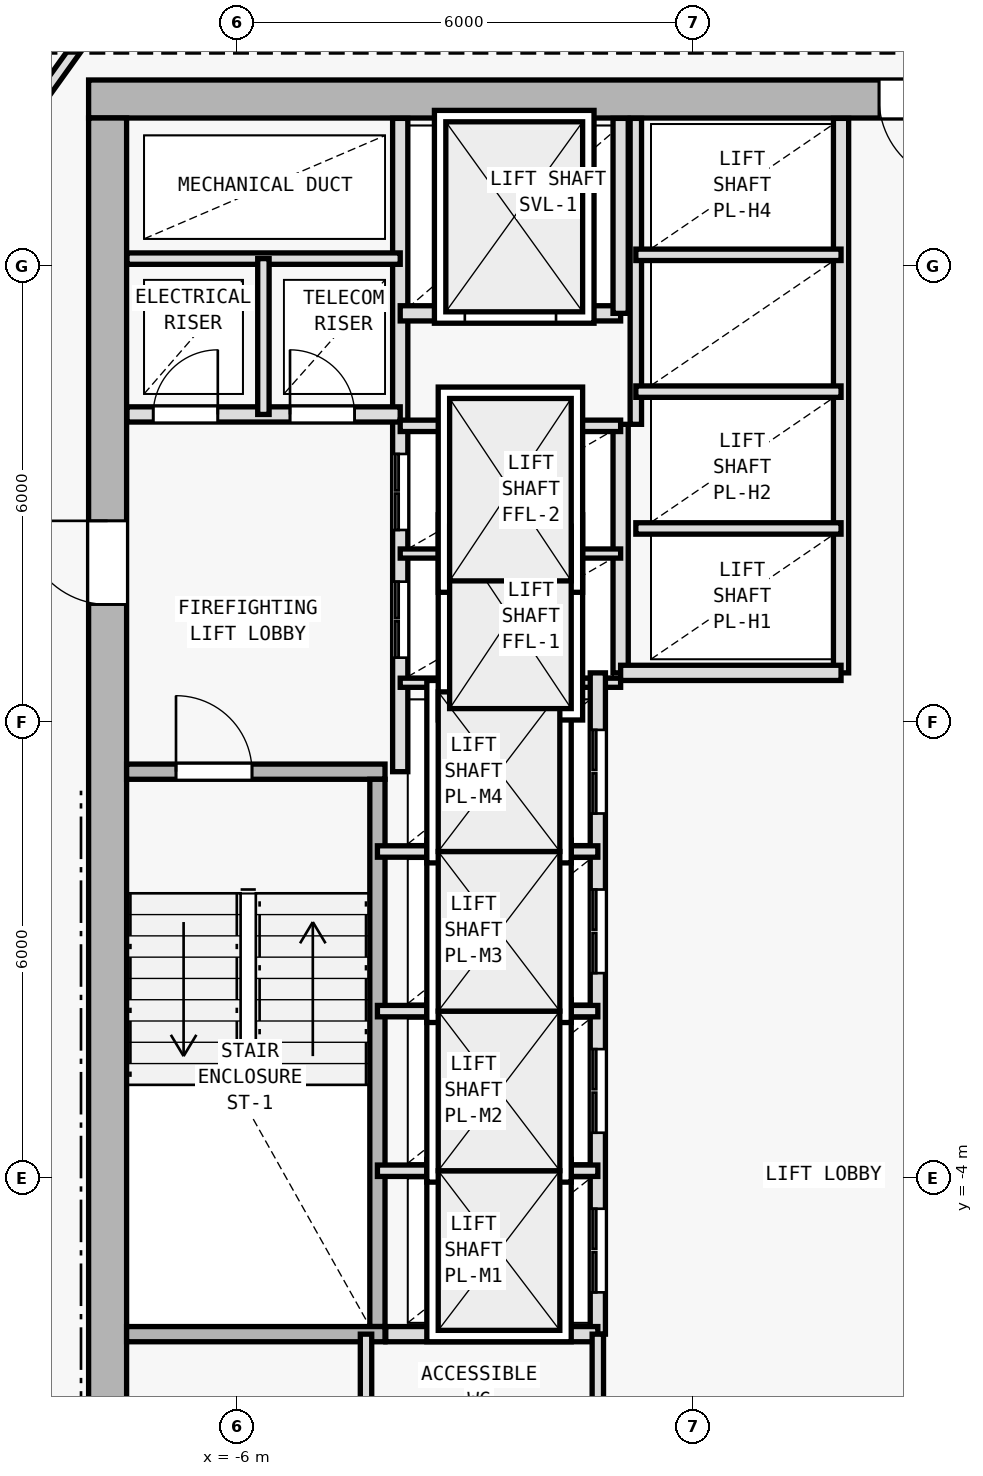
"""IFC4 building model, lengths in metres.
Left out: names, types, materials, properties, quantities, classifications, styles, units other than length and angle.
Written with IfcOpenShell. Run it as: python <this file> out.ifc"""

import sys

from ifc_helpers import new_model, si_unit, direction, frame, frame_2d, origin, origin_2d, place, context, subcontext, project, spatial, rectangle, i_section, extrude, element, fill, save


model = new_model("IFC4")
c1 = context("Model", 3, precision=1e-05, world=origin(), true_north=direction((0.0, 1.0)))
c2 = subcontext(c1, "Body", "Model", "MODEL_VIEW")
j1 = project(units=[si_unit("LENGTHUNIT", "METRE"), si_unit("PLANEANGLEUNIT", "RADIAN")], contexts=[c1])
p1 = place(None, origin())
s1 = spatial("IfcSite", under=j1, at=p1, CompositionType="ELEMENT")
p2 = place(p1, origin())
s2 = spatial("IfcBuilding", under=s1, at=p2, CompositionType="ELEMENT")
p3 = place(p2, frame((0.0, 0.0, 153.0)))
s3 = spatial("IfcBuildingStorey", under=s2, at=p3, CompositionType="ELEMENT", Elevation=153.0)
for number, where, z_axis, x_axis in (
    (1, (-7.7, 10.2, 0.0), (0.0, 0.0, 1.0), (1.0, 0.0, 0.0)),
    (2, (-7.7, 2.0, 0.0), (0.0, 0.0, 1.0), (1.0, 0.0, 0.0)),
):
    element("IfcColumn", number, at=place(p3, frame(where, z_axis=z_axis, x_axis=x_axis)), inside=s3, PredefinedType="COLUMN", context=c2, shape_type="SweptSolid", body=[
        extrude(i_section(OverallWidth=0.404, OverallDepth=0.407, WebThickness=0.017, FlangeThickness=0.028, FilletRadius=0.015, at=origin_2d()), origin(), (0.0, 0.0, 1.0), 3.6),
    ])
p4 = place(p3, frame((7.95, 10.2, 0.0), z_axis=(0.0, 0.0, 1.0), x_axis=(-1.0, 0.0, 0.0)))
e3 = element("IfcWall", 3, at=p4, inside=s3, PredefinedType="SHEAR", context=c2, shape_type="SweptSolid", body=[
    extrude(rectangle(XDim=15.9, YDim=0.5, at=frame_2d((7.95, 0.0))), origin(), (0.0, 0.0, 1.0), 3.35),
])
p5 = place(p4, frame((4.4, 0.0, 0.0)))
e4 = element("IfcOpeningElement", 4, at=p5, cuts=e3, PredefinedType="OPENING", context=c2, shape_type="SweptSolid", body=[
    extrude(rectangle(XDim=1.1, YDim=2.15, at=frame_2d((0.55, 1.075))), frame((0.0, 0.26, 0.0), z_axis=(0.0, -1.0, 0.0), x_axis=(1.0, 0.0, 0.0)), (0.0, 0.0, 1.0), 0.52),
])
p6 = place(p3, frame((-7.7, -9.15, 0.0), z_axis=(0.0, 0.0, 1.0), x_axis=(0.0, 1.0, 0.0)))
e5 = element("IfcWall", 5, at=p6, inside=s3, PredefinedType="SHEAR", context=c2, shape_type="SweptSolid", body=[
    extrude(rectangle(XDim=19.1, YDim=0.5, at=frame_2d((9.55, 0.0))), origin(), (0.0, 0.0, 1.0), 3.35),
])
p7 = place(p6, frame((12.7, 0.0, 0.0)))
e6 = element("IfcOpeningElement", 6, at=p7, cuts=e5, PredefinedType="OPENING", context=c2, shape_type="SweptSolid", body=[
    extrude(rectangle(XDim=1.1, YDim=2.15, at=frame_2d((0.55, 1.075))), frame((0.0, 0.26, 0.0), z_axis=(0.0, -1.0, 0.0), x_axis=(1.0, 0.0, 0.0)), (0.0, 0.0, 1.0), 0.52),
])
p8 = place(p3, frame((-7.45, 1.35, 0.0), z_axis=(0.0, 0.0, 1.0), x_axis=(1.0, 0.0, 0.0)))
e7 = element("IfcWall", 7, at=p8, inside=s3, PredefinedType="SOLIDWALL", context=c2, shape_type="SweptSolid", body=[
    extrude(rectangle(XDim=3.4, YDim=0.2, at=frame_2d((1.7, 0.0))), origin(), (0.0, 0.0, 1.0), 3.35),
])
p9 = place(p8, frame((0.65, 0.0, 0.0)))
e8 = element("IfcOpeningElement", 8, at=p9, cuts=e7, PredefinedType="OPENING", context=c2, shape_type="SweptSolid", body=[
    extrude(rectangle(XDim=1.0, YDim=2.15, at=frame_2d((0.5, 1.075))), frame((0.0, 0.11, 0.0), z_axis=(0.0, -1.0, 0.0), x_axis=(1.0, 0.0, 0.0)), (0.0, 0.0, 1.0), 0.22),
])
p10 = place(p3, frame((-4.15, -5.95, 0.0), z_axis=(0.0, 0.0, 1.0), x_axis=(0.0, 1.0, 0.0)))
e9 = element("IfcWall", 9, at=p10, inside=s3, PredefinedType="SOLIDWALL", context=c2, shape_type="SweptSolid", body=[
    extrude(rectangle(XDim=7.2, YDim=0.2, at=frame_2d((3.6, 0.0))), origin(), (0.0, 0.0, 1.0), 3.35),
])
p11 = place(p3, frame((-3.85, 1.35, 0.0), z_axis=(0.0, 0.0, 1.0), x_axis=(0.0, 1.0, 0.0)))
e10 = element("IfcWall", 10, at=p11, inside=s3, PredefinedType="SOLIDWALL", context=c2, shape_type="SweptSolid", body=[
    extrude(rectangle(XDim=8.595, YDim=0.2, at=frame_2d((4.297, 0.0))), origin(), (0.0, 0.0, 1.0), 3.35),
])
p12 = place(p11, frame((1.5, 0.0, 0.0)))
e11 = element("IfcOpeningElement", 11, at=p12, cuts=e10, PredefinedType="OPENING", context=c2, shape_type="SweptSolid", body=[
    extrude(rectangle(XDim=1.0, YDim=2.15, at=frame_2d((0.5, 1.075))), frame((0.0, 0.11, 0.0), z_axis=(0.0, -1.0, 0.0), x_axis=(1.0, 0.0, 0.0)), (0.0, 0.0, 1.0), 0.22),
])
p13 = place(p11, frame((3.18, 0.0, 0.0)))
e12 = element("IfcOpeningElement", 12, at=p13, cuts=e10, PredefinedType="OPENING", context=c2, shape_type="SweptSolid", body=[
    extrude(rectangle(XDim=1.0, YDim=2.15, at=frame_2d((0.5, 1.075))), frame((0.0, 0.11, 0.0), z_axis=(0.0, -1.0, 0.0), x_axis=(1.0, 0.0, 0.0)), (0.0, 0.0, 1.0), 0.22),
])
p14 = place(p3, frame((-7.445, 6.05, 0.0), z_axis=(0.0, 0.0, 1.0), x_axis=(1.0, 0.0, 0.0)))
e13 = element("IfcWall", 13, at=p14, inside=s3, PredefinedType="SOLIDWALL", context=c2, shape_type="SweptSolid", body=[
    extrude(rectangle(XDim=3.595, YDim=0.2, at=frame_2d((1.797, 0.0))), origin(), (0.0, 0.0, 1.0), 3.35),
])
p15 = place(p14, frame((0.345, 0.0, 0.0)))
e14 = element("IfcOpeningElement", 14, at=p15, cuts=e13, PredefinedType="OPENING", context=c2, shape_type="SweptSolid", body=[
    extrude(rectangle(XDim=0.85, YDim=2.1, at=frame_2d((0.425, 1.05))), frame((0.0, 0.11, 0.0), z_axis=(0.0, -1.0, 0.0), x_axis=(1.0, 0.0, 0.0)), (0.0, 0.0, 1.0), 0.22),
])
p16 = place(p14, frame((2.145, 0.0, 0.0)))
e15 = element("IfcOpeningElement", 15, at=p16, cuts=e13, PredefinedType="OPENING", context=c2, shape_type="SweptSolid", body=[
    extrude(rectangle(XDim=0.85, YDim=2.1, at=frame_2d((0.425, 1.05))), frame((0.0, 0.11, 0.0), z_axis=(0.0, -1.0, 0.0), x_axis=(1.0, 0.0, 0.0)), (0.0, 0.0, 1.0), 0.22),
])
p17 = place(p3, frame((-7.445, 8.1, 0.0), z_axis=(0.0, 0.0, 1.0), x_axis=(1.0, 0.0, 0.0)))
e16 = element("IfcWall", 16, at=p17, inside=s3, PredefinedType="PARTITIONING", context=c2, shape_type="SweptSolid", body=[
    extrude(rectangle(XDim=3.595, YDim=0.15, at=frame_2d((1.797, 0.0))), origin(), (0.0, 0.0, 1.0), 3.35),
])
p18 = place(p3, frame((-5.65, 6.05, 0.0), z_axis=(0.0, 0.0, 1.0), x_axis=(0.0, 1.0, 0.0)))
e17 = element("IfcWall", 17, at=p18, inside=s3, PredefinedType="PARTITIONING", context=c2, shape_type="SweptSolid", body=[
    extrude(rectangle(XDim=2.05, YDim=0.15, at=frame_2d((1.025, 0.0))), origin(), (0.0, 0.0, 1.0), 3.35),
])
p19 = place(p3, frame((-0.95, 2.65, 0.0), z_axis=(0.0, 0.0, 1.0), x_axis=(0.0, 1.0, 0.0)))
e18 = element("IfcWall", 18, at=p19, inside=s3, PredefinedType="SOLIDWALL", context=c2, shape_type="SweptSolid", body=[
    extrude(rectangle(XDim=3.27, YDim=0.2, at=frame_2d((1.635, 0.0))), origin(), (0.0, 0.0, 1.0), 3.35),
])
for number, where, z_axis, x_axis in (
    (19, (-3.85, 2.52, 0.0), (0.0, 0.0, 1.0), (1.0, 0.0, 0.0)),
    (20, (-3.85, 4.22, 0.0), (0.0, 0.0, 1.0), (1.0, 0.0, 0.0)),
):
    element("IfcWall", number, at=place(p3, frame(where, z_axis=z_axis, x_axis=x_axis)), inside=s3, PredefinedType="PARTITIONING", context=c2, shape_type="SweptSolid", body=[
        extrude(rectangle(XDim=2.9, YDim=0.12, at=frame_2d((1.45, 0.0))), origin(), (0.0, 0.0, 1.0), 3.35),
    ])
p20 = place(p3, frame((-3.85, 5.9, 0.0), z_axis=(0.0, 0.0, 1.0), x_axis=(1.0, 0.0, 0.0)))
e21 = element("IfcWall", 21, at=p20, inside=s3, PredefinedType="PARTITIONING", context=c2, shape_type="SweptSolid", body=[
    extrude(rectangle(XDim=2.9, YDim=0.15, at=frame_2d((1.45, 0.0))), origin(), (0.0, 0.0, 1.0), 3.35),
])
p21 = place(p3, frame((-3.85, 7.38, 0.0), z_axis=(0.0, 0.0, 1.0), x_axis=(1.0, 0.0, 0.0)))
e22 = element("IfcWall", 22, at=p21, inside=s3, PredefinedType="SOLIDWALL", context=c2, shape_type="SweptSolid", body=[
    extrude(rectangle(XDim=2.9, YDim=0.2, at=frame_2d((1.45, 0.0))), origin(), (0.0, 0.0, 1.0), 3.35),
])
p22 = place(p21, frame((0.85, 0.0, 0.0)))
e23 = element("IfcOpeningElement", 23, at=p22, cuts=e22, PredefinedType="OPENING", context=c2, shape_type="SweptSolid", body=[
    extrude(rectangle(XDim=1.2, YDim=2.2, at=frame_2d((0.6, 1.1))), frame((0.0, 0.11, 0.0), z_axis=(0.0, -1.0, 0.0), x_axis=(1.0, 0.0, 0.0)), (0.0, 0.0, 1.0), 0.22),
])
p23 = place(p3, frame((-0.95, 7.38, 0.0), z_axis=(0.0, 0.0, 1.0), x_axis=(0.0, 1.0, 0.0)))
e24 = element("IfcWall", 24, at=p23, inside=s3, PredefinedType="SOLIDWALL", context=c2, shape_type="SweptSolid", body=[
    extrude(rectangle(XDim=2.565, YDim=0.2, at=frame_2d((1.283, 0.0))), origin(), (0.0, 0.0, 1.0), 3.35),
])
p24 = place(p3, frame((-1.25, -6.05, 0.0), z_axis=(0.0, 0.0, 1.0), x_axis=(0.0, 1.0, 0.0)))
e25 = element("IfcWall", 25, at=p24, inside=s3, PredefinedType="SOLIDWALL", context=c2, shape_type="SweptSolid", body=[
    extrude(rectangle(XDim=8.7, YDim=0.2, at=frame_2d((4.35, 0.0))), origin(), (0.0, 0.0, 1.0), 3.35),
])
p25 = place(p24, frame((0.55, 0.0, 0.0)))
e26 = element("IfcOpeningElement", 26, at=p25, cuts=e25, PredefinedType="OPENING", context=c2, shape_type="SweptSolid", body=[
    extrude(rectangle(XDim=1.1, YDim=2.15, at=frame_2d((0.55, 1.075))), frame((0.0, 0.11, 0.0), z_axis=(0.0, -1.0, 0.0), x_axis=(1.0, 0.0, 0.0)), (0.0, 0.0, 1.0), 0.22),
])
p26 = place(p24, frame((2.65, 0.0, 0.0)))
e27 = element("IfcOpeningElement", 27, at=p26, cuts=e25, PredefinedType="OPENING", context=c2, shape_type="SweptSolid", body=[
    extrude(rectangle(XDim=1.1, YDim=2.15, at=frame_2d((0.55, 1.075))), frame((0.0, 0.11, 0.0), z_axis=(0.0, -1.0, 0.0), x_axis=(1.0, 0.0, 0.0)), (0.0, 0.0, 1.0), 0.22),
])
p27 = place(p24, frame((4.75, 0.0, 0.0)))
e28 = element("IfcOpeningElement", 28, at=p27, cuts=e25, PredefinedType="OPENING", context=c2, shape_type="SweptSolid", body=[
    extrude(rectangle(XDim=1.1, YDim=2.15, at=frame_2d((0.55, 1.075))), frame((0.0, 0.11, 0.0), z_axis=(0.0, -1.0, 0.0), x_axis=(1.0, 0.0, 0.0)), (0.0, 0.0, 1.0), 0.22),
])
p28 = place(p24, frame((6.85, 0.0, 0.0)))
e29 = element("IfcOpeningElement", 29, at=p28, cuts=e25, PredefinedType="OPENING", context=c2, shape_type="SweptSolid", body=[
    extrude(rectangle(XDim=1.1, YDim=2.15, at=frame_2d((0.55, 1.075))), frame((0.0, 0.11, 0.0), z_axis=(0.0, -1.0, 0.0), x_axis=(1.0, 0.0, 0.0)), (0.0, 0.0, 1.0), 0.22),
])
for number, where, z_axis, x_axis in (
    (30, (-4.15, -3.9, 0.0), (0.0, 0.0, 1.0), (1.0, 0.0, 0.0)),
    (31, (-4.15, -1.8, 0.0), (0.0, 0.0, 1.0), (1.0, 0.0, 0.0)),
    (32, (-4.15, 0.3, 0.0), (0.0, 0.0, 1.0), (1.0, 0.0, 0.0)),
):
    element("IfcWall", number, at=place(p3, frame(where, z_axis=z_axis, x_axis=x_axis)), inside=s3, PredefinedType="PARTITIONING", context=c2, shape_type="SweptSolid", body=[
        extrude(rectangle(XDim=2.9, YDim=0.15, at=frame_2d((1.45, 0.0))), origin(), (0.0, 0.0, 1.0), 3.35),
    ])
p29 = place(p3, frame((1.95, 2.65, 0.0), z_axis=(0.0, 0.0, 1.0), x_axis=(0.0, 1.0, 0.0)))
e33 = element("IfcWall", 33, at=p29, inside=s3, PredefinedType="SOLIDWALL", context=c2, shape_type="SweptSolid", body=[
    extrude(rectangle(XDim=7.295, YDim=0.2, at=frame_2d((3.647, 0.0))), origin(), (0.0, 0.0, 1.0), 3.35),
])
p30 = place(p3, frame((-0.95, 2.65, 0.0), z_axis=(0.0, 0.0, 1.0), x_axis=(1.0, 0.0, 0.0)))
e34 = element("IfcWall", 34, at=p30, inside=s3, PredefinedType="SOLIDWALL", context=c2, shape_type="SweptSolid", body=[
    extrude(rectangle(XDim=2.9, YDim=0.2, at=frame_2d((1.45, 0.0))), origin(), (0.0, 0.0, 1.0), 3.35),
])
p31 = place(p3, frame((-0.75, 5.92, 0.0), z_axis=(0.0, 0.0, 1.0), x_axis=(0.0, 1.0, 0.0)))
e35 = element("IfcWall", 35, at=p31, inside=s3, PredefinedType="PARTITIONING", context=c2, shape_type="SweptSolid", body=[
    extrude(rectangle(XDim=4.025, YDim=0.15, at=frame_2d((2.013, 0.0))), origin(), (0.0, 0.0, 1.0), 3.35),
])
for number, where, z_axis, x_axis in (
    (36, (-0.75, 4.55, 0.0), (0.0, 0.0, 1.0), (1.0, 0.0, 0.0)),
    (37, (-0.75, 6.35, 0.0), (0.0, 0.0, 1.0), (1.0, 0.0, 0.0)),
    (38, (-0.75, 8.15, 0.0), (0.0, 0.0, 1.0), (1.0, 0.0, 0.0)),
):
    element("IfcWall", number, at=place(p3, frame(where, z_axis=z_axis, x_axis=x_axis)), inside=s3, PredefinedType="PARTITIONING", context=c2, shape_type="SweptSolid", body=[
        extrude(rectangle(XDim=2.7, YDim=0.15, at=frame_2d((1.35, 0.0))), origin(), (0.0, 0.0, 1.0), 3.35),
    ])
p32 = place(p3, frame((-7.45, -6.05, 0.0), z_axis=(0.0, 0.0, 1.0), x_axis=(1.0, 0.0, 0.0)))
e39 = element("IfcWall", 39, at=p32, inside=s3, PredefinedType="SOLIDWALL", context=c2, shape_type="SweptSolid", body=[
    extrude(rectangle(XDim=3.4, YDim=0.2, at=frame_2d((1.7, 0.0))), origin(), (0.0, 0.0, 1.0), 3.35),
])
p33 = place(p3, frame((-4.04, -6.05, 0.0), z_axis=(0.0, 0.0, 1.0), x_axis=(1.0, 0.0, 0.0)))
e40 = element("IfcWall", 40, at=p33, inside=s3, PredefinedType="SOLIDWALL", context=c2, shape_type="SweptSolid", body=[
    extrude(rectangle(XDim=2.79, YDim=0.2, at=frame_2d((1.395, 0.0))), origin(), (0.0, 0.0, 1.0), 3.35),
])
p34 = place(p3, frame((-1.25, -9.145, 0.0), z_axis=(0.0, 0.0, 1.0), x_axis=(0.0, 1.0, 0.0)))
e41 = element("IfcWall", 41, at=p34, inside=s3, PredefinedType="PARTITIONING", context=c2, shape_type="SweptSolid", body=[
    extrude(rectangle(XDim=3.095, YDim=0.15, at=frame_2d((1.547, 0.0))), origin(), (0.0, 0.0, 1.0), 3.35),
])
p35 = place(p34, frame((0.845, 0.0, 0.0)))
e42 = element("IfcOpeningElement", 42, at=p35, cuts=e41, PredefinedType="OPENING", context=c2, shape_type="SweptSolid", body=[
    extrude(rectangle(XDim=0.95, YDim=2.1, at=frame_2d((0.475, 1.05))), frame((0.0, 0.085, 0.0), z_axis=(0.0, -1.0, 0.0), x_axis=(1.0, 0.0, 0.0)), (0.0, 0.0, 1.0), 0.17),
])
p36 = place(p3, frame((-4.3, -9.145, 0.0), z_axis=(0.0, 0.0, 1.0), x_axis=(0.0, 1.0, 0.0)))
e43 = element("IfcWall", 43, at=p36, inside=s3, PredefinedType="PARTITIONING", context=c2, shape_type="SweptSolid", body=[
    extrude(rectangle(XDim=3.095, YDim=0.15, at=frame_2d((1.547, 0.0))), origin(), (0.0, 0.0, 1.0), 3.35),
])
p37 = place(p36, frame((0.845, 0.0, 0.0)))
e44 = element("IfcOpeningElement", 44, at=p37, cuts=e43, PredefinedType="OPENING", context=c2, shape_type="SweptSolid", body=[
    extrude(rectangle(XDim=0.9, YDim=2.1, at=frame_2d((0.45, 1.05))), frame((0.0, 0.085, 0.0), z_axis=(0.0, -1.0, 0.0), x_axis=(1.0, 0.0, 0.0)), (0.0, 0.0, 1.0), 0.17),
])
p38 = place(p3, frame((-9.86, 8.426, 0.0), z_axis=(0.0, 0.0, 1.0), x_axis=(0.582449511476, 0.812866881218, 0.0)))
e45 = element("IfcWall", 45, at=p38, inside=s3, PredefinedType="PARTITIONING", context=c2, shape_type="SweptSolid", body=[
    extrude(rectangle(XDim=4.84, YDim=0.15, at=frame_2d((2.42, 0.0))), origin(), (0.0, 0.0, 1.0), 2.965),
])
p39 = place(p7, origin())
e46 = element("IfcDoor", 46, at=p39, inside=s3, OperationType="SINGLE_SWING_RIGHT", PredefinedType="DOOR", context=c2, shape_type="SweptSolid", body=[
    extrude(rectangle(XDim=1.1, YDim=2.15, at=frame_2d((0.55, 1.075))), frame((0.0, 0.025, 0.0), z_axis=(0.0, -1.0, 0.0), x_axis=(1.0, 0.0, 0.0)), (0.0, 0.0, 1.0), 0.05),
])
fill(e6, e46)
p40 = place(p5, origin())
e47 = element("IfcDoor", 47, at=p40, inside=s3, OperationType="SINGLE_SWING_LEFT", PredefinedType="DOOR", context=c2, shape_type="SweptSolid", body=[
    extrude(rectangle(XDim=1.1, YDim=2.15, at=frame_2d((0.55, 1.075))), frame((0.0, 0.025, 0.0), z_axis=(0.0, -1.0, 0.0), x_axis=(1.0, 0.0, 0.0)), (0.0, 0.0, 1.0), 0.05),
])
fill(e4, e47)
p41 = place(p9, origin())
e48 = element("IfcDoor", 48, at=p41, inside=s3, OperationType="SINGLE_SWING_LEFT", PredefinedType="DOOR", context=c2, shape_type="SweptSolid", body=[
    extrude(rectangle(XDim=1.0, YDim=2.15, at=frame_2d((0.5, 1.075))), frame((0.0, 0.025, 0.0), z_axis=(0.0, -1.0, 0.0), x_axis=(1.0, 0.0, 0.0)), (0.0, 0.0, 1.0), 0.05),
])
fill(e8, e48)
p42 = place(p15, origin())
e49 = element("IfcDoor", 49, at=p42, inside=s3, OperationType="SINGLE_SWING_RIGHT", PredefinedType="DOOR", context=c2, shape_type="SweptSolid", body=[
    extrude(rectangle(XDim=0.85, YDim=2.1, at=frame_2d((0.425, 1.05))), frame((0.0, 0.025, 0.0), z_axis=(0.0, -1.0, 0.0), x_axis=(1.0, 0.0, 0.0)), (0.0, 0.0, 1.0), 0.05),
])
fill(e14, e49)
p43 = place(p16, origin())
e50 = element("IfcDoor", 50, at=p43, inside=s3, OperationType="SINGLE_SWING_LEFT", PredefinedType="DOOR", context=c2, shape_type="SweptSolid", body=[
    extrude(rectangle(XDim=0.85, YDim=2.1, at=frame_2d((0.425, 1.05))), frame((0.0, 0.025, 0.0), z_axis=(0.0, -1.0, 0.0), x_axis=(1.0, 0.0, 0.0)), (0.0, 0.0, 1.0), 0.05),
])
fill(e15, e50)
p44 = place(p22, origin())
e51 = element("IfcDoor", 51, at=p44, inside=s3, OperationType="DOUBLE_DOOR_SLIDING", PredefinedType="DOOR", context=c2, shape_type="SweptSolid", body=[
    extrude(rectangle(XDim=1.2, YDim=2.2, at=frame_2d((0.6, 1.1))), frame((0.0, 0.025, 0.0), z_axis=(0.0, -1.0, 0.0), x_axis=(1.0, 0.0, 0.0)), (0.0, 0.0, 1.0), 0.05),
])
fill(e23, e51)
p45 = place(p25, origin())
e52 = element("IfcDoor", 52, at=p45, inside=s3, OperationType="DOUBLE_DOOR_SLIDING", PredefinedType="DOOR", context=c2, shape_type="SweptSolid", body=[
    extrude(rectangle(XDim=1.1, YDim=2.15, at=frame_2d((0.55, 1.075))), frame((0.0, 0.025, 0.0), z_axis=(0.0, -1.0, 0.0), x_axis=(1.0, 0.0, 0.0)), (0.0, 0.0, 1.0), 0.05),
])
fill(e26, e52)
p46 = place(p26, origin())
e53 = element("IfcDoor", 53, at=p46, inside=s3, OperationType="DOUBLE_DOOR_SLIDING", PredefinedType="DOOR", context=c2, shape_type="SweptSolid", body=[
    extrude(rectangle(XDim=1.1, YDim=2.15, at=frame_2d((0.55, 1.075))), frame((0.0, 0.025, 0.0), z_axis=(0.0, -1.0, 0.0), x_axis=(1.0, 0.0, 0.0)), (0.0, 0.0, 1.0), 0.05),
])
fill(e27, e53)
p47 = place(p27, origin())
e54 = element("IfcDoor", 54, at=p47, inside=s3, OperationType="DOUBLE_DOOR_SLIDING", PredefinedType="DOOR", context=c2, shape_type="SweptSolid", body=[
    extrude(rectangle(XDim=1.1, YDim=2.15, at=frame_2d((0.55, 1.075))), frame((0.0, 0.025, 0.0), z_axis=(0.0, -1.0, 0.0), x_axis=(1.0, 0.0, 0.0)), (0.0, 0.0, 1.0), 0.05),
])
fill(e28, e54)
p48 = place(p28, origin())
e55 = element("IfcDoor", 55, at=p48, inside=s3, OperationType="DOUBLE_DOOR_SLIDING", PredefinedType="DOOR", context=c2, shape_type="SweptSolid", body=[
    extrude(rectangle(XDim=1.1, YDim=2.15, at=frame_2d((0.55, 1.075))), frame((0.0, 0.025, 0.0), z_axis=(0.0, -1.0, 0.0), x_axis=(1.0, 0.0, 0.0)), (0.0, 0.0, 1.0), 0.05),
])
fill(e29, e55)
p49 = place(p12, origin())
e56 = element("IfcDoor", 56, at=p49, inside=s3, OperationType="DOUBLE_DOOR_SLIDING", PredefinedType="DOOR", context=c2, shape_type="SweptSolid", body=[
    extrude(rectangle(XDim=1.0, YDim=2.15, at=frame_2d((0.5, 1.075))), frame((0.0, 0.025, 0.0), z_axis=(0.0, -1.0, 0.0), x_axis=(1.0, 0.0, 0.0)), (0.0, 0.0, 1.0), 0.05),
])
fill(e11, e56)
p50 = place(p13, origin())
e57 = element("IfcDoor", 57, at=p50, inside=s3, OperationType="DOUBLE_DOOR_SLIDING", PredefinedType="DOOR", context=c2, shape_type="SweptSolid", body=[
    extrude(rectangle(XDim=1.0, YDim=2.15, at=frame_2d((0.5, 1.075))), frame((0.0, 0.025, 0.0), z_axis=(0.0, -1.0, 0.0), x_axis=(1.0, 0.0, 0.0)), (0.0, 0.0, 1.0), 0.05),
])
fill(e12, e57)
save(model, sys.argv[1])
